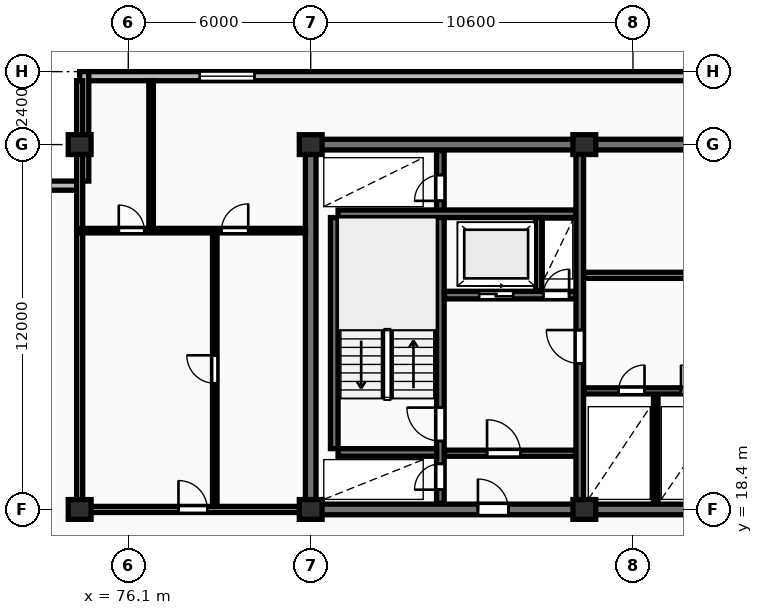
"""IFC4 building model, lengths in metres.
Left out: names, types, materials, properties, quantities, classifications, styles, units other than length and angle.
Written with IfcOpenShell. Run it as: python <this file> out.ifc"""

import sys

from ifc_helpers import new_model, si_unit, direction, frame, frame_2d, origin, origin_2d, place, context, subcontext, project, spatial, rectangle, extrude, element, fill, save


model = new_model("IFC4")
c1 = context("Model", 3, precision=1e-05, world=origin(), true_north=direction((0.0, 1.0)))
c2 = subcontext(c1, "Body", "Model", "MODEL_VIEW")
j1 = project(units=[si_unit("LENGTHUNIT", "METRE"), si_unit("PLANEANGLEUNIT", "RADIAN")], contexts=[c1])
p1 = place(None, origin())
s1 = spatial("IfcSite", under=j1, at=p1, CompositionType="ELEMENT")
p2 = place(p1, origin())
s2 = spatial("IfcBuilding", under=s1, at=p2, CompositionType="ELEMENT")
p3 = place(p2, frame((0.0, 0.0, 201.1)))
s3 = spatial("IfcBuildingStorey", under=s2, at=p3, CompositionType="ELEMENT", Elevation=201.1)
for number, where, z_axis, x_axis in (
    (1, (74.5, 18.4, 0.0), (0.0, 0.0, 1.0), (1.0, 0.0, 0.0)),
    (2, (74.5, 30.4, 0.0), (0.0, 0.0, 1.0), (1.0, 0.0, 0.0)),
    (3, (82.1, 18.4, 0.0), (0.0, 0.0, 1.0), (1.0, 0.0, 0.0)),
    (4, (82.1, 30.4, 0.0), (0.0, 0.0, 1.0), (1.0, 0.0, 0.0)),
    (5, (91.1, 18.4, 0.0), (0.0, 0.0, 1.0), (1.0, 0.0, 0.0)),
    (6, (91.1, 30.4, 0.0), (0.0, 0.0, 1.0), (1.0, 0.0, 0.0)),
):
    element("IfcColumn", number, at=place(p3, frame(where, z_axis=z_axis, x_axis=x_axis)), inside=s3, PredefinedType="COLUMN", context=c2, shape_type="SweptSolid", body=[
        extrude(rectangle(XDim=0.75, YDim=0.65, at=origin_2d()), origin(), (0.0, 0.0, 1.0), 3.25),
    ])
p4 = place(p3, frame((128.9, 32.65, 0.0), z_axis=(0.0, 0.0, 1.0), x_axis=(-1.0, 0.0, 0.0)))
e7 = element("IfcWall", 7, at=p4, inside=s3, PredefinedType="STANDARD", context=c2, shape_type="SweptSolid", body=[
    extrude(rectangle(XDim=54.4, YDim=0.3, at=frame_2d((27.2, 0.0))), origin(), (0.0, 0.0, 1.0), 2.97),
])
p5 = place(p4, frame((48.65, 0.0, 0.85)))
e8 = element("IfcOpeningElement", 8, at=p5, cuts=e7, PredefinedType="OPENING", context=c2, shape_type="SweptSolid", body=[
    extrude(rectangle(XDim=1.8, YDim=1.8, at=frame_2d((0.9, 0.9))), frame((0.0, 0.16, 0.0), z_axis=(0.0, -1.0, 0.0), x_axis=(1.0, 0.0, 0.0)), (0.0, 0.0, 1.0), 0.32),
])
p6 = place(p4, frame((4.975, 0.0, 0.85)))
e9 = element("IfcOpeningElement", 9, at=p6, cuts=e7, PredefinedType="OPENING", context=c2, shape_type="SweptSolid", body=[
    extrude(rectangle(XDim=1.8, YDim=1.8, at=frame_2d((0.9, 0.9))), frame((0.0, 0.16, 0.0), z_axis=(0.0, -1.0, 0.0), x_axis=(1.0, 0.0, 0.0)), (0.0, 0.0, 1.0), 0.32),
])
p7 = place(p3, frame((74.65, 32.8, 0.0), z_axis=(0.0, 0.0, 1.0), x_axis=(0.0, -1.0, 0.0)))
e10 = element("IfcWall", 10, at=p7, inside=s3, PredefinedType="STANDARD", context=c2, shape_type="SweptSolid", body=[
    extrude(rectangle(XDim=3.6, YDim=0.3, at=frame_2d((1.8, 0.0))), origin(), (0.0, 0.0, 1.0), 2.2),
])
p8 = place(p3, frame((74.5, 29.05, 0.0), z_axis=(0.0, 0.0, 1.0), x_axis=(-1.0, 0.0, 0.0)))
e11 = element("IfcWall", 11, at=p8, inside=s3, PredefinedType="STANDARD", context=c2, shape_type="SweptSolid", body=[
    extrude(rectangle(XDim=3.6, YDim=0.3, at=frame_2d((1.8, 0.0))), origin(), (0.0, 0.0, 1.0), 2.97),
])
p9 = place(p3, frame((81.925, 30.4, 0.0), z_axis=(0.0, 0.0, 1.0), x_axis=(1.0, 0.0, 0.0)))
e12 = element("IfcWall", 12, at=p9, inside=s3, PredefinedType="SHEAR", context=c2, shape_type="SweptSolid", body=[
    extrude(rectangle(XDim=36.265, YDim=0.35, at=frame_2d((18.132, 0.0))), origin(), (0.0, 0.0, 1.0), 3.25),
])
p10 = place(p3, frame((82.1, 18.575, 0.0), z_axis=(0.0, 0.0, 1.0), x_axis=(0.0, 1.0, 0.0)))
e13 = element("IfcWall", 13, at=p10, inside=s3, PredefinedType="SHEAR", context=c2, shape_type="SweptSolid", body=[
    extrude(rectangle(XDim=11.65, YDim=0.35, at=frame_2d((5.825, 0.0))), origin(), (0.0, 0.0, 1.0), 3.25),
])
p11 = place(p3, frame((81.925, 18.4, 0.0), z_axis=(0.0, 0.0, 1.0), x_axis=(1.0, 0.0, 0.0)))
e14 = element("IfcWall", 14, at=p11, inside=s3, PredefinedType="SHEAR", context=c2, shape_type="SweptSolid", body=[
    extrude(rectangle(XDim=36.265, YDim=0.35, at=frame_2d((18.132, 0.0))), origin(), (0.0, 0.0, 1.0), 3.25),
])
p12 = place(p11, frame((5.675, 0.0, 0.0)))
e15 = element("IfcOpeningElement", 15, at=p12, cuts=e14, PredefinedType="OPENING", context=c2, shape_type="SweptSolid", body=[
    extrude(rectangle(XDim=1.0, YDim=2.15, at=frame_2d((0.5, 1.075))), frame((0.0, 0.185, 0.0), z_axis=(0.0, -1.0, 0.0), x_axis=(1.0, 0.0, 0.0)), (0.0, 0.0, 1.0), 0.37),
])
p13 = place(p11, frame((21.925, 0.0, 0.0)))
e16 = element("IfcOpeningElement", 16, at=p13, cuts=e14, PredefinedType="OPENING", context=c2, shape_type="SweptSolid", body=[
    extrude(rectangle(XDim=1.5, YDim=2.2, at=frame_2d((0.75, 1.1))), frame((0.0, 0.185, 0.0), z_axis=(0.0, -1.0, 0.0), x_axis=(1.0, 0.0, 0.0)), (0.0, 0.0, 1.0), 0.37),
])
p14 = place(p11, frame((29.875, 0.0, 0.0)))
e17 = element("IfcOpeningElement", 17, at=p14, cuts=e14, PredefinedType="OPENING", context=c2, shape_type="SweptSolid", body=[
    extrude(rectangle(XDim=1.0, YDim=2.15, at=frame_2d((0.5, 1.075))), frame((0.0, 0.185, 0.0), z_axis=(0.0, -1.0, 0.0), x_axis=(1.0, 0.0, 0.0)), (0.0, 0.0, 1.0), 0.37),
])
p15 = place(p3, frame((82.875, 20.4, 0.0), z_axis=(0.0, 0.0, 1.0), x_axis=(0.0, 1.0, 0.0)))
e18 = element("IfcWall", 18, at=p15, inside=s3, PredefinedType="SHEAR", context=c2, shape_type="SweptSolid", body=[
    extrude(rectangle(XDim=7.6, YDim=0.25, at=frame_2d((3.8, 0.0))), origin(), (0.0, 0.0, 1.0), 3.25),
])
p16 = place(p3, frame((86.365, 18.6, 0.0), z_axis=(0.0, 0.0, 1.0), x_axis=(0.0, 1.0, 0.0)))
e19 = element("IfcWall", 19, at=p16, inside=s3, PredefinedType="SHEAR", context=c2, shape_type="SweptSolid", body=[
    extrude(rectangle(XDim=11.6, YDim=0.25, at=frame_2d((5.8, 0.0))), origin(), (0.0, 0.0, 1.0), 3.25),
])
p17 = place(p16, frame((0.45, 0.0, 0.0)))
e20 = element("IfcOpeningElement", 20, at=p17, cuts=e19, PredefinedType="OPENING", context=c2, shape_type="SweptSolid", body=[
    extrude(rectangle(XDim=0.85, YDim=2.05, at=frame_2d((0.425, 1.025))), frame((0.0, 0.135, 0.0), z_axis=(0.0, -1.0, 0.0), x_axis=(1.0, 0.0, 0.0)), (0.0, 0.0, 1.0), 0.27),
])
p18 = place(p16, frame((2.05, 0.0, 0.0)))
e21 = element("IfcOpeningElement", 21, at=p18, cuts=e19, PredefinedType="OPENING", context=c2, shape_type="SweptSolid", body=[
    extrude(rectangle(XDim=1.1, YDim=2.1, at=frame_2d((0.55, 1.05))), frame((0.0, 0.135, 0.0), z_axis=(0.0, -1.0, 0.0), x_axis=(1.0, 0.0, 0.0)), (0.0, 0.0, 1.0), 0.27),
])
p19 = place(p16, frame((9.95, 0.0, 0.0)))
e22 = element("IfcOpeningElement", 22, at=p19, cuts=e19, PredefinedType="OPENING", context=c2, shape_type="SweptSolid", body=[
    extrude(rectangle(XDim=0.85, YDim=2.05, at=frame_2d((0.425, 1.025))), frame((0.0, 0.135, 0.0), z_axis=(0.0, -1.0, 0.0), x_axis=(1.0, 0.0, 0.0)), (0.0, 0.0, 1.0), 0.27),
])
p20 = place(p3, frame((83.0, 20.275, 0.0), z_axis=(0.0, 0.0, 1.0), x_axis=(1.0, 0.0, 0.0)))
e23 = element("IfcWall", 23, at=p20, inside=s3, PredefinedType="SHEAR", context=c2, shape_type="SweptSolid", body=[
    extrude(rectangle(XDim=3.24, YDim=0.25, at=frame_2d((1.62, 0.0))), origin(), (0.0, 0.0, 1.0), 3.25),
])
p21 = place(p3, frame((83.0, 28.125, 0.0), z_axis=(0.0, 0.0, 1.0), x_axis=(1.0, 0.0, 0.0)))
e24 = element("IfcWall", 24, at=p21, inside=s3, PredefinedType="SHEAR", context=c2, shape_type="SweptSolid", body=[
    extrude(rectangle(XDim=7.82, YDim=0.25, at=frame_2d((3.91, 0.0))), origin(), (0.0, 0.0, 1.0), 3.25),
])
p22 = place(p3, frame((86.5, 25.45, 0.0), z_axis=(0.0, 0.0, 1.0), x_axis=(1.0, 0.0, 0.0)))
e25 = element("IfcWall", 25, at=p22, inside=s3, PredefinedType="SHEAR", context=c2, shape_type="SweptSolid", body=[
    extrude(rectangle(XDim=4.32, YDim=0.25, at=frame_2d((2.16, 0.0))), origin(), (0.0, 0.0, 1.0), 3.25),
])
p23 = place(p22, frame((1.14, 0.0, 0.0)))
e26 = element("IfcOpeningElement", 26, at=p23, cuts=e25, PredefinedType="OPENING", context=c2, shape_type="SweptSolid", body=[
    extrude(rectangle(XDim=1.12, YDim=2.12, at=frame_2d((0.56, 1.06))), frame((0.0, 0.135, 0.0), z_axis=(0.0, -1.0, 0.0), x_axis=(1.0, 0.0, 0.0)), (0.0, 0.0, 1.0), 0.27),
])
p24 = place(p22, frame((3.25, 0.0, 0.0)))
e27 = element("IfcOpeningElement", 27, at=p24, cuts=e25, PredefinedType="OPENING", context=c2, shape_type="SweptSolid", body=[
    extrude(rectangle(XDim=0.85, YDim=2.05, at=frame_2d((0.425, 1.025))), frame((0.0, 0.135, 0.0), z_axis=(0.0, -1.0, 0.0), x_axis=(1.0, 0.0, 0.0)), (0.0, 0.0, 1.0), 0.27),
])
p25 = place(p3, frame((89.6, 25.58, 0.0), z_axis=(0.0, 0.0, 1.0), x_axis=(0.0, 1.0, 0.0)))
e28 = element("IfcWall", 28, at=p25, inside=s3, PredefinedType="PARTITIONING", context=c2, shape_type="SweptSolid", body=[
    extrude(rectangle(XDim=2.42, YDim=0.2, at=frame_2d((1.21, 0.0))), origin(), (0.0, 0.0, 1.0), 2.97),
])
p26 = place(p3, frame((86.5, 20.25, 0.0), z_axis=(0.0, 0.0, 1.0), x_axis=(1.0, 0.0, 0.0)))
e29 = element("IfcWall", 29, at=p26, inside=s3, PredefinedType="PARTITIONING", context=c2, shape_type="SweptSolid", body=[
    extrude(rectangle(XDim=4.32, YDim=0.2, at=frame_2d((2.16, 0.0))), origin(), (0.0, 0.0, 1.0), 2.97),
])
p27 = place(p26, frame((1.4, 0.0, 0.0)))
e30 = element("IfcOpeningElement", 30, at=p27, cuts=e29, PredefinedType="OPENING", context=c2, shape_type="SweptSolid", body=[
    extrude(rectangle(XDim=1.1, YDim=2.1, at=frame_2d((0.55, 1.05))), frame((0.0, 0.11, 0.0), z_axis=(0.0, -1.0, 0.0), x_axis=(1.0, 0.0, 0.0)), (0.0, 0.0, 1.0), 0.22),
])
p28 = place(p3, frame((90.95, 18.6, 0.0), z_axis=(0.0, 0.0, 1.0), x_axis=(0.0, 1.0, 0.0)))
e31 = element("IfcWall", 31, at=p28, inside=s3, PredefinedType="SHEAR", context=c2, shape_type="SweptSolid", body=[
    extrude(rectangle(XDim=11.6, YDim=0.25, at=frame_2d((5.8, 0.0))), origin(), (0.0, 0.0, 1.0), 3.25),
])
p29 = place(p28, frame((4.6, 0.0, 0.0)))
e32 = element("IfcOpeningElement", 32, at=p29, cuts=e31, PredefinedType="OPENING", context=c2, shape_type="SweptSolid", body=[
    extrude(rectangle(XDim=1.1, YDim=2.1, at=frame_2d((0.55, 1.05))), frame((0.0, 0.135, 0.0), z_axis=(0.0, -1.0, 0.0), x_axis=(1.0, 0.0, 0.0)), (0.0, 0.0, 1.0), 0.27),
])
p30 = place(p3, frame((91.08, 26.1, 0.0), z_axis=(0.0, 0.0, 1.0), x_axis=(1.0, 0.0, 0.0)))
e33 = element("IfcWall", 33, at=p30, inside=s3, PredefinedType="PARTITIONING", context=c2, shape_type="SweptSolid", body=[
    extrude(rectangle(XDim=8.34, YDim=0.2, at=frame_2d((4.17, 0.0))), origin(), (0.0, 0.0, 1.0), 2.97),
])
p31 = place(p30, frame((3.4, 0.0, 0.0)))
e34 = element("IfcOpeningElement", 34, at=p31, cuts=e33, PredefinedType="OPENING", context=c2, shape_type="SweptSolid", body=[
    extrude(rectangle(XDim=0.92, YDim=2.08, at=frame_2d((0.46, 1.04))), frame((0.0, 0.11, 0.0), z_axis=(0.0, -1.0, 0.0), x_axis=(1.0, 0.0, 0.0)), (0.0, 0.0, 1.0), 0.22),
])
p32 = place(p3, frame((93.45, 18.6, 0.0), z_axis=(0.0, 0.0, 1.0), x_axis=(0.0, 1.0, 0.0)))
e35 = element("IfcWall", 35, at=p32, inside=s3, PredefinedType="PARTITIONING", context=c2, shape_type="SweptSolid", body=[
    extrude(rectangle(XDim=3.6, YDim=0.15, at=frame_2d((1.8, 0.0))), origin(), (0.0, 0.0, 1.0), 2.97),
])
p33 = place(p3, frame((91.08, 22.3, 0.0), z_axis=(0.0, 0.0, 1.0), x_axis=(1.0, 0.0, 0.0)))
e36 = element("IfcWall", 36, at=p33, inside=s3, PredefinedType="PARTITIONING", context=c2, shape_type="SweptSolid", body=[
    extrude(rectangle(XDim=19.14, YDim=0.2, at=frame_2d((9.57, 0.0))), origin(), (0.0, 0.0, 1.0), 2.97),
])
p34 = place(p33, frame((1.15, 0.0, 0.0)))
e37 = element("IfcOpeningElement", 37, at=p34, cuts=e36, PredefinedType="OPENING", context=c2, shape_type="SweptSolid", body=[
    extrude(rectangle(XDim=0.85, YDim=2.05, at=frame_2d((0.425, 1.025))), frame((0.0, 0.11, 0.0), z_axis=(0.0, -1.0, 0.0), x_axis=(1.0, 0.0, 0.0)), (0.0, 0.0, 1.0), 0.22),
])
p35 = place(p33, frame((3.2, 0.0, 0.0)))
e38 = element("IfcOpeningElement", 38, at=p35, cuts=e36, PredefinedType="OPENING", context=c2, shape_type="SweptSolid", body=[
    extrude(rectangle(XDim=0.85, YDim=2.05, at=frame_2d((0.425, 1.025))), frame((0.0, 0.11, 0.0), z_axis=(0.0, -1.0, 0.0), x_axis=(1.0, 0.0, 0.0)), (0.0, 0.0, 1.0), 0.22),
])
p36 = place(p33, frame((12.72, 0.0, 0.0)))
e39 = element("IfcOpeningElement", 39, at=p36, cuts=e36, PredefinedType="OPENING", context=c2, shape_type="SweptSolid", body=[
    extrude(rectangle(XDim=1.5, YDim=2.2, at=frame_2d((0.75, 1.1))), frame((0.0, 0.11, 0.0), z_axis=(0.0, -1.0, 0.0), x_axis=(1.0, 0.0, 0.0)), (0.0, 0.0, 1.0), 0.22),
])
p37 = place(p33, frame((6.42, 0.0, 0.0)))
e40 = element("IfcOpeningElement", 40, at=p37, cuts=e36, PredefinedType="OPENING", context=c2, shape_type="SweptSolid", body=[
    extrude(rectangle(XDim=0.92, YDim=2.08, at=frame_2d((0.46, 1.04))), frame((0.0, 0.11, 0.0), z_axis=(0.0, -1.0, 0.0), x_axis=(1.0, 0.0, 0.0)), (0.0, 0.0, 1.0), 0.22),
])
p38 = place(p33, frame((15.92, 0.0, 0.0)))
e41 = element("IfcOpeningElement", 41, at=p38, cuts=e36, PredefinedType="OPENING", context=c2, shape_type="SweptSolid", body=[
    extrude(rectangle(XDim=0.88, YDim=2.06, at=frame_2d((0.44, 1.03))), frame((0.0, 0.11, 0.0), z_axis=(0.0, -1.0, 0.0), x_axis=(1.0, 0.0, 0.0)), (0.0, 0.0, 1.0), 0.22),
])
p39 = place(p3, frame((74.5, 18.4, 0.0), z_axis=(0.0, 0.0, 1.0), x_axis=(0.0, 1.0, 0.0)))
e42 = element("IfcWall", 42, at=p39, inside=s3, PredefinedType="PARTITIONING", context=c2, shape_type="SweptSolid", body=[
    extrude(rectangle(XDim=14.1, YDim=0.2, at=frame_2d((7.05, 0.0))), origin(), (0.0, 0.0, 1.0), 2.2),
])
p40 = place(p3, frame((78.945, 18.45, 0.0), z_axis=(0.0, 0.0, 1.0), x_axis=(0.0, 1.0, 0.0)))
e43 = element("IfcWall", 43, at=p40, inside=s3, PredefinedType="PARTITIONING", context=c2, shape_type="SweptSolid", body=[
    extrude(rectangle(XDim=9.12, YDim=0.15, at=frame_2d((4.56, 0.0))), origin(), (0.0, 0.0, 1.0), 2.97),
])
p41 = place(p40, frame((4.1, 0.0, 0.0)))
e44 = element("IfcOpeningElement", 44, at=p41, cuts=e43, PredefinedType="OPENING", context=c2, shape_type="SweptSolid", body=[
    extrude(rectangle(XDim=0.92, YDim=2.08, at=frame_2d((0.46, 1.04))), frame((0.0, 0.085, 0.0), z_axis=(0.0, -1.0, 0.0), x_axis=(1.0, 0.0, 0.0)), (0.0, 0.0, 1.0), 0.17),
])
p42 = place(p3, frame((76.85, 27.57, 0.0), z_axis=(0.0, 0.0, 1.0), x_axis=(0.0, 1.0, 0.0)))
e45 = element("IfcWall", 45, at=p42, inside=s3, PredefinedType="PARTITIONING", context=c2, shape_type="SweptSolid", body=[
    extrude(rectangle(XDim=4.93, YDim=0.15, at=frame_2d((2.465, 0.0))), origin(), (0.0, 0.0, 1.0), 2.97),
])
p43 = place(p3, frame((74.52, 27.57, 0.0), z_axis=(0.0, 0.0, 1.0), x_axis=(1.0, 0.0, 0.0)))
e46 = element("IfcWall", 46, at=p43, inside=s3, PredefinedType="PARTITIONING", context=c2, shape_type="SweptSolid", body=[
    extrude(rectangle(XDim=7.41, YDim=0.15, at=frame_2d((3.705, 0.0))), origin(), (0.0, 0.0, 1.0), 2.97),
])
p44 = place(p43, frame((1.266, 0.0, 0.0)))
e47 = element("IfcOpeningElement", 47, at=p44, cuts=e46, PredefinedType="OPENING", context=c2, shape_type="SweptSolid", body=[
    extrude(rectangle(XDim=0.84, YDim=2.04, at=frame_2d((0.42, 1.02))), frame((0.0, 0.085, 0.0), z_axis=(0.0, -1.0, 0.0), x_axis=(1.0, 0.0, 0.0)), (0.0, 0.0, 1.0), 0.17),
])
p45 = place(p43, frame((4.645, 0.0, 0.0)))
e48 = element("IfcOpeningElement", 48, at=p45, cuts=e46, PredefinedType="OPENING", context=c2, shape_type="SweptSolid", body=[
    extrude(rectangle(XDim=0.88, YDim=2.06, at=frame_2d((0.44, 1.03))), frame((0.0, 0.085, 0.0), z_axis=(0.0, -1.0, 0.0), x_axis=(1.0, 0.0, 0.0)), (0.0, 0.0, 1.0), 0.17),
])
p46 = place(p3, frame((74.5, 18.4, 0.0), z_axis=(0.0, 0.0, 1.0), x_axis=(1.0, 0.0, 0.0)))
e49 = element("IfcWall", 49, at=p46, inside=s3, PredefinedType="PARTITIONING", context=c2, shape_type="SweptSolid", body=[
    extrude(rectangle(XDim=7.45, YDim=0.2, at=frame_2d((3.725, 0.0))), origin(), (0.0, 0.0, 1.0), 2.358),
])
p47 = place(p46, frame((3.25, 0.0, 0.0)))
e50 = element("IfcOpeningElement", 50, at=p47, cuts=e49, PredefinedType="OPENING", context=c2, shape_type="SweptSolid", body=[
    extrude(rectangle(XDim=0.95, YDim=2.15, at=frame_2d((0.475, 1.075))), frame((0.0, 0.11, 0.0), z_axis=(0.0, -1.0, 0.0), x_axis=(1.0, 0.0, 0.0)), (0.0, 0.0, 1.0), 0.22),
])
p48 = place(p5, origin())
e51 = element("IfcWindow", 51, at=p48, inside=s3, PartitioningType="SINGLE_PANEL", PredefinedType="WINDOW", context=c2, shape_type="SweptSolid", body=[
    extrude(rectangle(XDim=1.8, YDim=1.8, at=frame_2d((0.9, 0.9))), frame((0.0, 0.03, 0.0), z_axis=(0.0, -1.0, 0.0), x_axis=(1.0, 0.0, 0.0)), (0.0, 0.0, 1.0), 0.06),
])
fill(e8, e51)
p49 = place(p12, origin())
e52 = element("IfcDoor", 52, at=p49, inside=s3, OperationType="SINGLE_SWING_LEFT", PredefinedType="DOOR", context=c2, shape_type="SweptSolid", body=[
    extrude(rectangle(XDim=1.0, YDim=2.15, at=frame_2d((0.5, 1.075))), frame((0.0, 0.025, 0.0), z_axis=(0.0, -1.0, 0.0), x_axis=(1.0, 0.0, 0.0)), (0.0, 0.0, 1.0), 0.05),
])
fill(e15, e52)
p50 = place(p17, origin())
e53 = element("IfcDoor", 53, at=p50, inside=s3, OperationType="SINGLE_SWING_LEFT", PredefinedType="DOOR", context=c2, shape_type="SweptSolid", body=[
    extrude(rectangle(XDim=0.85, YDim=2.05, at=frame_2d((0.425, 1.025))), frame((0.0, 0.025, 0.0), z_axis=(0.0, -1.0, 0.0), x_axis=(1.0, 0.0, 0.0)), (0.0, 0.0, 1.0), 0.05),
])
fill(e20, e53)
p51 = place(p18, origin())
e54 = element("IfcDoor", 54, at=p51, inside=s3, OperationType="SINGLE_SWING_RIGHT", PredefinedType="DOOR", context=c2, shape_type="SweptSolid", body=[
    extrude(rectangle(XDim=1.1, YDim=2.1, at=frame_2d((0.55, 1.05))), frame((0.0, 0.025, 0.0), z_axis=(0.0, -1.0, 0.0), x_axis=(1.0, 0.0, 0.0)), (0.0, 0.0, 1.0), 0.05),
])
fill(e21, e54)
p52 = place(p19, origin())
e55 = element("IfcDoor", 55, at=p52, inside=s3, OperationType="SINGLE_SWING_LEFT", PredefinedType="DOOR", context=c2, shape_type="SweptSolid", body=[
    extrude(rectangle(XDim=0.85, YDim=2.05, at=frame_2d((0.425, 1.025))), frame((0.0, 0.025, 0.0), z_axis=(0.0, -1.0, 0.0), x_axis=(1.0, 0.0, 0.0)), (0.0, 0.0, 1.0), 0.05),
])
fill(e22, e55)
p53 = place(p23, origin())
e56 = element("IfcDoor", 56, at=p53, inside=s3, OperationType="SLIDING_TO_RIGHT", PredefinedType="DOOR", context=c2, shape_type="SweptSolid", body=[
    extrude(rectangle(XDim=1.12, YDim=2.12, at=frame_2d((0.56, 1.06))), frame((0.0, 0.025, 0.0), z_axis=(0.0, -1.0, 0.0), x_axis=(1.0, 0.0, 0.0)), (0.0, 0.0, 1.0), 0.05),
])
fill(e26, e56)
p54 = place(p24, origin())
e57 = element("IfcDoor", 57, at=p54, inside=s3, OperationType="SINGLE_SWING_RIGHT", PredefinedType="DOOR", context=c2, shape_type="SweptSolid", body=[
    extrude(rectangle(XDim=0.85, YDim=2.05, at=frame_2d((0.425, 1.025))), frame((0.0, 0.025, 0.0), z_axis=(0.0, -1.0, 0.0), x_axis=(1.0, 0.0, 0.0)), (0.0, 0.0, 1.0), 0.05),
])
fill(e27, e57)
p55 = place(p27, origin())
e58 = element("IfcDoor", 58, at=p55, inside=s3, OperationType="SINGLE_SWING_LEFT", PredefinedType="DOOR", context=c2, shape_type="SweptSolid", body=[
    extrude(rectangle(XDim=1.1, YDim=2.1, at=frame_2d((0.55, 1.05))), frame((0.0, 0.025, 0.0), z_axis=(0.0, -1.0, 0.0), x_axis=(1.0, 0.0, 0.0)), (0.0, 0.0, 1.0), 0.05),
])
fill(e30, e58)
p56 = place(p29, origin())
e59 = element("IfcDoor", 59, at=p56, inside=s3, OperationType="SINGLE_SWING_RIGHT", PredefinedType="DOOR", context=c2, shape_type="SweptSolid", body=[
    extrude(rectangle(XDim=1.1, YDim=2.1, at=frame_2d((0.55, 1.05))), frame((0.0, 0.025, 0.0), z_axis=(0.0, -1.0, 0.0), x_axis=(1.0, 0.0, 0.0)), (0.0, 0.0, 1.0), 0.05),
])
fill(e32, e59)
p57 = place(p34, origin())
e60 = element("IfcDoor", 60, at=p57, inside=s3, OperationType="SINGLE_SWING_RIGHT", PredefinedType="DOOR", context=c2, shape_type="SweptSolid", body=[
    extrude(rectangle(XDim=0.85, YDim=2.05, at=frame_2d((0.425, 1.025))), frame((0.0, 0.025, 0.0), z_axis=(0.0, -1.0, 0.0), x_axis=(1.0, 0.0, 0.0)), (0.0, 0.0, 1.0), 0.05),
])
fill(e37, e60)
p58 = place(p35, origin())
e61 = element("IfcDoor", 61, at=p58, inside=s3, OperationType="SINGLE_SWING_LEFT", PredefinedType="DOOR", context=c2, shape_type="SweptSolid", body=[
    extrude(rectangle(XDim=0.85, YDim=2.05, at=frame_2d((0.425, 1.025))), frame((0.0, 0.025, 0.0), z_axis=(0.0, -1.0, 0.0), x_axis=(1.0, 0.0, 0.0)), (0.0, 0.0, 1.0), 0.05),
])
fill(e38, e61)
p59 = place(p41, origin())
e62 = element("IfcDoor", 62, at=p59, inside=s3, OperationType="SINGLE_SWING_RIGHT", PredefinedType="DOOR", context=c2, shape_type="SweptSolid", body=[
    extrude(rectangle(XDim=0.92, YDim=2.08, at=frame_2d((0.46, 1.04))), frame((0.0, 0.025, 0.0), z_axis=(0.0, -1.0, 0.0), x_axis=(1.0, 0.0, 0.0)), (0.0, 0.0, 1.0), 0.05),
])
fill(e44, e62)
p60 = place(p44, origin())
e63 = element("IfcDoor", 63, at=p60, inside=s3, OperationType="SINGLE_SWING_LEFT", PredefinedType="DOOR", context=c2, shape_type="SweptSolid", body=[
    extrude(rectangle(XDim=0.84, YDim=2.04, at=frame_2d((0.42, 1.02))), frame((0.0, 0.025, 0.0), z_axis=(0.0, -1.0, 0.0), x_axis=(1.0, 0.0, 0.0)), (0.0, 0.0, 1.0), 0.05),
])
fill(e47, e63)
p61 = place(p45, origin())
e64 = element("IfcDoor", 64, at=p61, inside=s3, OperationType="SINGLE_SWING_RIGHT", PredefinedType="DOOR", context=c2, shape_type="SweptSolid", body=[
    extrude(rectangle(XDim=0.88, YDim=2.06, at=frame_2d((0.44, 1.03))), frame((0.0, 0.025, 0.0), z_axis=(0.0, -1.0, 0.0), x_axis=(1.0, 0.0, 0.0)), (0.0, 0.0, 1.0), 0.05),
])
fill(e48, e64)
p62 = place(p47, origin())
e65 = element("IfcDoor", 65, at=p62, inside=s3, OperationType="SINGLE_SWING_LEFT", PredefinedType="DOOR", context=c2, shape_type="SweptSolid", body=[
    extrude(rectangle(XDim=0.95, YDim=2.15, at=frame_2d((0.475, 1.075))), frame((0.0, 0.025, 0.0), z_axis=(0.0, -1.0, 0.0), x_axis=(1.0, 0.0, 0.0)), (0.0, 0.0, 1.0), 0.05),
])
fill(e50, e65)
save(model, sys.argv[1])
